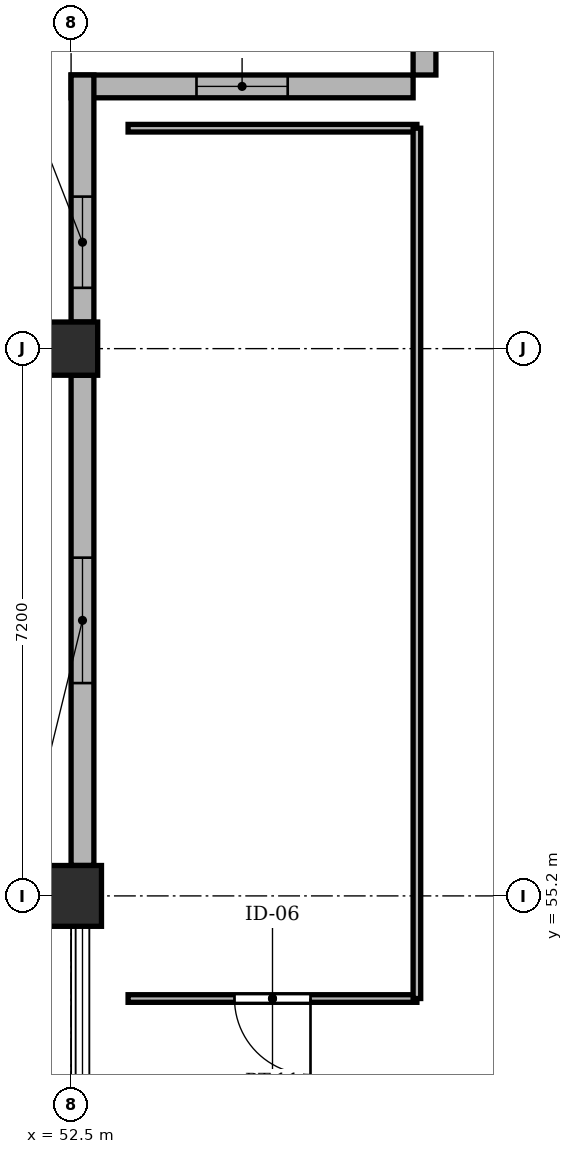
"""IFC4 building model, lengths in metres.
Left out: names, types, materials, properties, quantities, classifications, styles, units other than length and angle.
Written with IfcOpenShell. Run it as: python <this file> out.ifc"""

import sys

from ifc_helpers import new_model, si_unit, direction, frame, frame_2d, origin, origin_2d, place, context, subcontext, project, spatial, rectangle, extrude, element, fill, save


model = new_model("IFC4")
c1 = context("Model", 3, precision=1e-05, world=origin(), true_north=direction((0.0, 1.0)))
c2 = subcontext(c1, "Body", "Model", "MODEL_VIEW")
j1 = project(units=[si_unit("LENGTHUNIT", "METRE"), si_unit("PLANEANGLEUNIT", "RADIAN")], contexts=[c1])
p1 = place(None, origin())
s1 = spatial("IfcSite", under=j1, at=p1, CompositionType="ELEMENT")
p2 = place(p1, origin())
s2 = spatial("IfcBuilding", under=s1, at=p2, CompositionType="ELEMENT")
p3 = place(p2, frame((0.0, 0.0, 60.05)))
s3 = spatial("IfcBuildingStorey", under=s2, at=p3, CompositionType="ELEMENT", Elevation=60.05)
p4 = place(p3, frame((52.5, 55.2, -0.21), z_axis=(0.0, 0.0, 1.0), x_axis=(1.0, 0.0, 0.0)))
e1 = element("IfcColumn", 1, at=p4, inside=s3, PredefinedType="COLUMN", context=c2, shape_type="SweptSolid", body=[
    extrude(rectangle(XDim=0.8, YDim=0.8, at=origin_2d()), origin(), (0.0, 0.0, 1.0), 3.25),
])
p5 = place(p3, frame((52.5, 62.4, -0.21), z_axis=(0.0, 0.0, 1.0), x_axis=(1.0, 0.0, 0.0)))
e2 = element("IfcColumn", 2, at=p5, inside=s3, PredefinedType="COLUMN", context=c2, shape_type="SweptSolid", body=[
    extrude(rectangle(XDim=0.7, YDim=0.7, at=origin_2d()), origin(), (0.0, 0.0, 1.0), 3.25),
])
p6 = place(p3, frame((57.15, 69.6, 0.0), z_axis=(0.0, 0.0, 1.0), x_axis=(0.0, -1.0, 0.0)))
e3 = element("IfcWall", 3, at=p6, inside=s3, PredefinedType="SOLIDWALL", context=c2, shape_type="SweptSolid", body=[
    extrude(rectangle(XDim=3.6, YDim=0.3, at=frame_2d((1.8, 0.0))), origin(), (0.0, 0.0, 1.0), 2.53),
])
p7 = place(p6, frame((1.15, 0.0, 0.62)))
e4 = element("IfcOpeningElement", 4, at=p7, cuts=e3, PredefinedType="OPENING", context=c2, shape_type="SweptSolid", body=[
    extrude(rectangle(XDim=1.3, YDim=1.8, at=frame_2d((0.65, 0.9))), frame((0.0, 0.162, 0.0), z_axis=(0.0, -1.0, 0.0), x_axis=(1.0, 0.0, 0.0)), (0.0, 0.0, 1.0), 0.324),
])
p8 = place(p3, frame((57.0, 65.85, 0.0), z_axis=(0.0, 0.0, 1.0), x_axis=(-1.0, 0.0, 0.0)))
e5 = element("IfcWall", 5, at=p8, inside=s3, PredefinedType="SOLIDWALL", context=c2, shape_type="SweptSolid", body=[
    extrude(rectangle(XDim=4.5, YDim=0.3, at=frame_2d((2.25, 0.0))), origin(), (0.0, 0.0, 1.0), 2.53),
])
p9 = place(p8, frame((1.65, 0.0, 0.62)))
e6 = element("IfcOpeningElement", 6, at=p9, cuts=e5, PredefinedType="OPENING", context=c2, shape_type="SweptSolid", body=[
    extrude(rectangle(XDim=1.2, YDim=1.7, at=frame_2d((0.6, 0.85))), frame((0.0, 0.162, 0.0), z_axis=(0.0, -1.0, 0.0), x_axis=(1.0, 0.0, 0.0)), (0.0, 0.0, 1.0), 0.324),
])
p10 = place(p3, frame((52.65, 66.0, 0.0), z_axis=(0.0, 0.0, 1.0), x_axis=(0.0, -1.0, 0.0)))
e7 = element("IfcWall", 7, at=p10, inside=s3, PredefinedType="SOLIDWALL", context=c2, shape_type="SweptSolid", body=[
    extrude(rectangle(XDim=3.25, YDim=0.3, at=frame_2d((1.625, 0.0))), origin(), (0.0, 0.0, 1.0), 2.53),
])
p11 = place(p10, frame((1.6, 0.0, 0.62)))
e8 = element("IfcOpeningElement", 8, at=p11, cuts=e7, PredefinedType="OPENING", context=c2, shape_type="SweptSolid", body=[
    extrude(rectangle(XDim=1.2, YDim=1.65, at=frame_2d((0.6, 0.825))), frame((0.0, 0.162, 0.0), z_axis=(0.0, -1.0, 0.0), x_axis=(1.0, 0.0, 0.0)), (0.0, 0.0, 1.0), 0.324),
])
p12 = place(p3, frame((52.65, 62.05, 0.0), z_axis=(0.0, 0.0, 1.0), x_axis=(0.0, -1.0, 0.0)))
e9 = element("IfcWall", 9, at=p12, inside=s3, PredefinedType="SOLIDWALL", context=c2, shape_type="SweptSolid", body=[
    extrude(rectangle(XDim=6.45, YDim=0.3, at=frame_2d((3.225, 0.0))), origin(), (0.0, 0.0, 1.0), 2.53),
])
p13 = place(p12, frame((2.4, 0.0, 0.62)))
e10 = element("IfcOpeningElement", 10, at=p13, cuts=e9, PredefinedType="OPENING", context=c2, shape_type="SweptSolid", body=[
    extrude(rectangle(XDim=1.65, YDim=1.81, at=frame_2d((0.825, 0.905))), frame((0.0, 0.162, 0.0), z_axis=(0.0, -1.0, 0.0), x_axis=(1.0, 0.0, 0.0)), (0.0, 0.0, 1.0), 0.324),
])
p14 = place(p3, frame((53.25, 53.85, 0.0), z_axis=(0.0, 0.0, 1.0), x_axis=(1.0, 0.0, 0.0)))
e11 = element("IfcWall", 11, at=p14, inside=s3, PredefinedType="PARTITIONING", context=c2, shape_type="SweptSolid", body=[
    extrude(rectangle(XDim=3.8, YDim=0.1, at=frame_2d((1.9, 0.0))), origin(), (0.0, 0.0, 1.0), 2.53),
])
p15 = place(p14, frame((1.4, 0.0, 0.0)))
e12 = element("IfcOpeningElement", 12, at=p15, cuts=e11, PredefinedType="OPENING", context=c2, shape_type="SweptSolid", body=[
    extrude(rectangle(XDim=1.0, YDim=2.15, at=frame_2d((0.5, 1.075))), frame((0.0, 0.062, 0.0), z_axis=(0.0, -1.0, 0.0), x_axis=(1.0, 0.0, 0.0)), (0.0, 0.0, 1.0), 0.124),
])
p16 = place(p3, frame((53.25, 65.3, 0.0), z_axis=(0.0, 0.0, 1.0), x_axis=(1.0, 0.0, 0.0)))
e13 = element("IfcWall", 13, at=p16, inside=s3, PredefinedType="PARTITIONING", context=c2, shape_type="SweptSolid", body=[
    extrude(rectangle(XDim=3.8, YDim=0.1, at=frame_2d((1.9, 0.0))), origin(), (0.0, 0.0, 1.0), 2.53),
])
p17 = place(p3, frame((57.05, 53.85, 0.0), z_axis=(0.0, 0.0, 1.0), x_axis=(0.0, 1.0, 0.0)))
e14 = element("IfcWall", 14, at=p17, inside=s3, PredefinedType="PARTITIONING", context=c2, shape_type="SweptSolid", body=[
    extrude(rectangle(XDim=11.45, YDim=0.1, at=frame_2d((5.725, 0.0))), origin(), (0.0, 0.0, 1.0), 2.53),
])
p18 = place(p9, origin())
e15 = element("IfcWindow", 15, at=p18, inside=s3, PartitioningType="SINGLE_PANEL", PredefinedType="WINDOW", context=c2, shape_type="SweptSolid", body=[
    extrude(rectangle(XDim=1.2, YDim=1.7, at=frame_2d((0.6, 0.85))), frame((0.0, 0.03, 0.0), z_axis=(0.0, -1.0, 0.0), x_axis=(1.0, 0.0, 0.0)), (0.0, 0.0, 1.0), 0.06),
])
fill(e6, e15)
p19 = place(p11, origin())
e16 = element("IfcWindow", 16, at=p19, inside=s3, PartitioningType="SINGLE_PANEL", PredefinedType="WINDOW", context=c2, shape_type="SweptSolid", body=[
    extrude(rectangle(XDim=1.2, YDim=1.65, at=frame_2d((0.6, 0.825))), frame((0.0, 0.03, 0.0), z_axis=(0.0, -1.0, 0.0), x_axis=(1.0, 0.0, 0.0)), (0.0, 0.0, 1.0), 0.06),
])
fill(e8, e16)
p20 = place(p13, origin())
e17 = element("IfcWindow", 17, at=p20, inside=s3, PartitioningType="SINGLE_PANEL", PredefinedType="WINDOW", context=c2, shape_type="SweptSolid", body=[
    extrude(rectangle(XDim=1.65, YDim=1.81, at=frame_2d((0.825, 0.905))), frame((0.0, 0.03, 0.0), z_axis=(0.0, -1.0, 0.0), x_axis=(1.0, 0.0, 0.0)), (0.0, 0.0, 1.0), 0.06),
])
fill(e10, e17)
p21 = place(p15, frame((1.0, 0.0, 0.0), z_axis=(0.0, 0.0, 1.0), x_axis=(-1.0, 0.0, 0.0)))
e18 = element("IfcDoor", 18, at=p21, inside=s3, OperationType="SINGLE_SWING_RIGHT", PredefinedType="DOOR", context=c2, shape_type="SweptSolid", body=[
    extrude(rectangle(XDim=1.0, YDim=2.15, at=frame_2d((0.5, 1.075))), frame((0.0, 0.025, 0.0), z_axis=(0.0, -1.0, 0.0), x_axis=(1.0, 0.0, 0.0)), (0.0, 0.0, 1.0), 0.05),
])
fill(e12, e18)
save(model, sys.argv[1])
